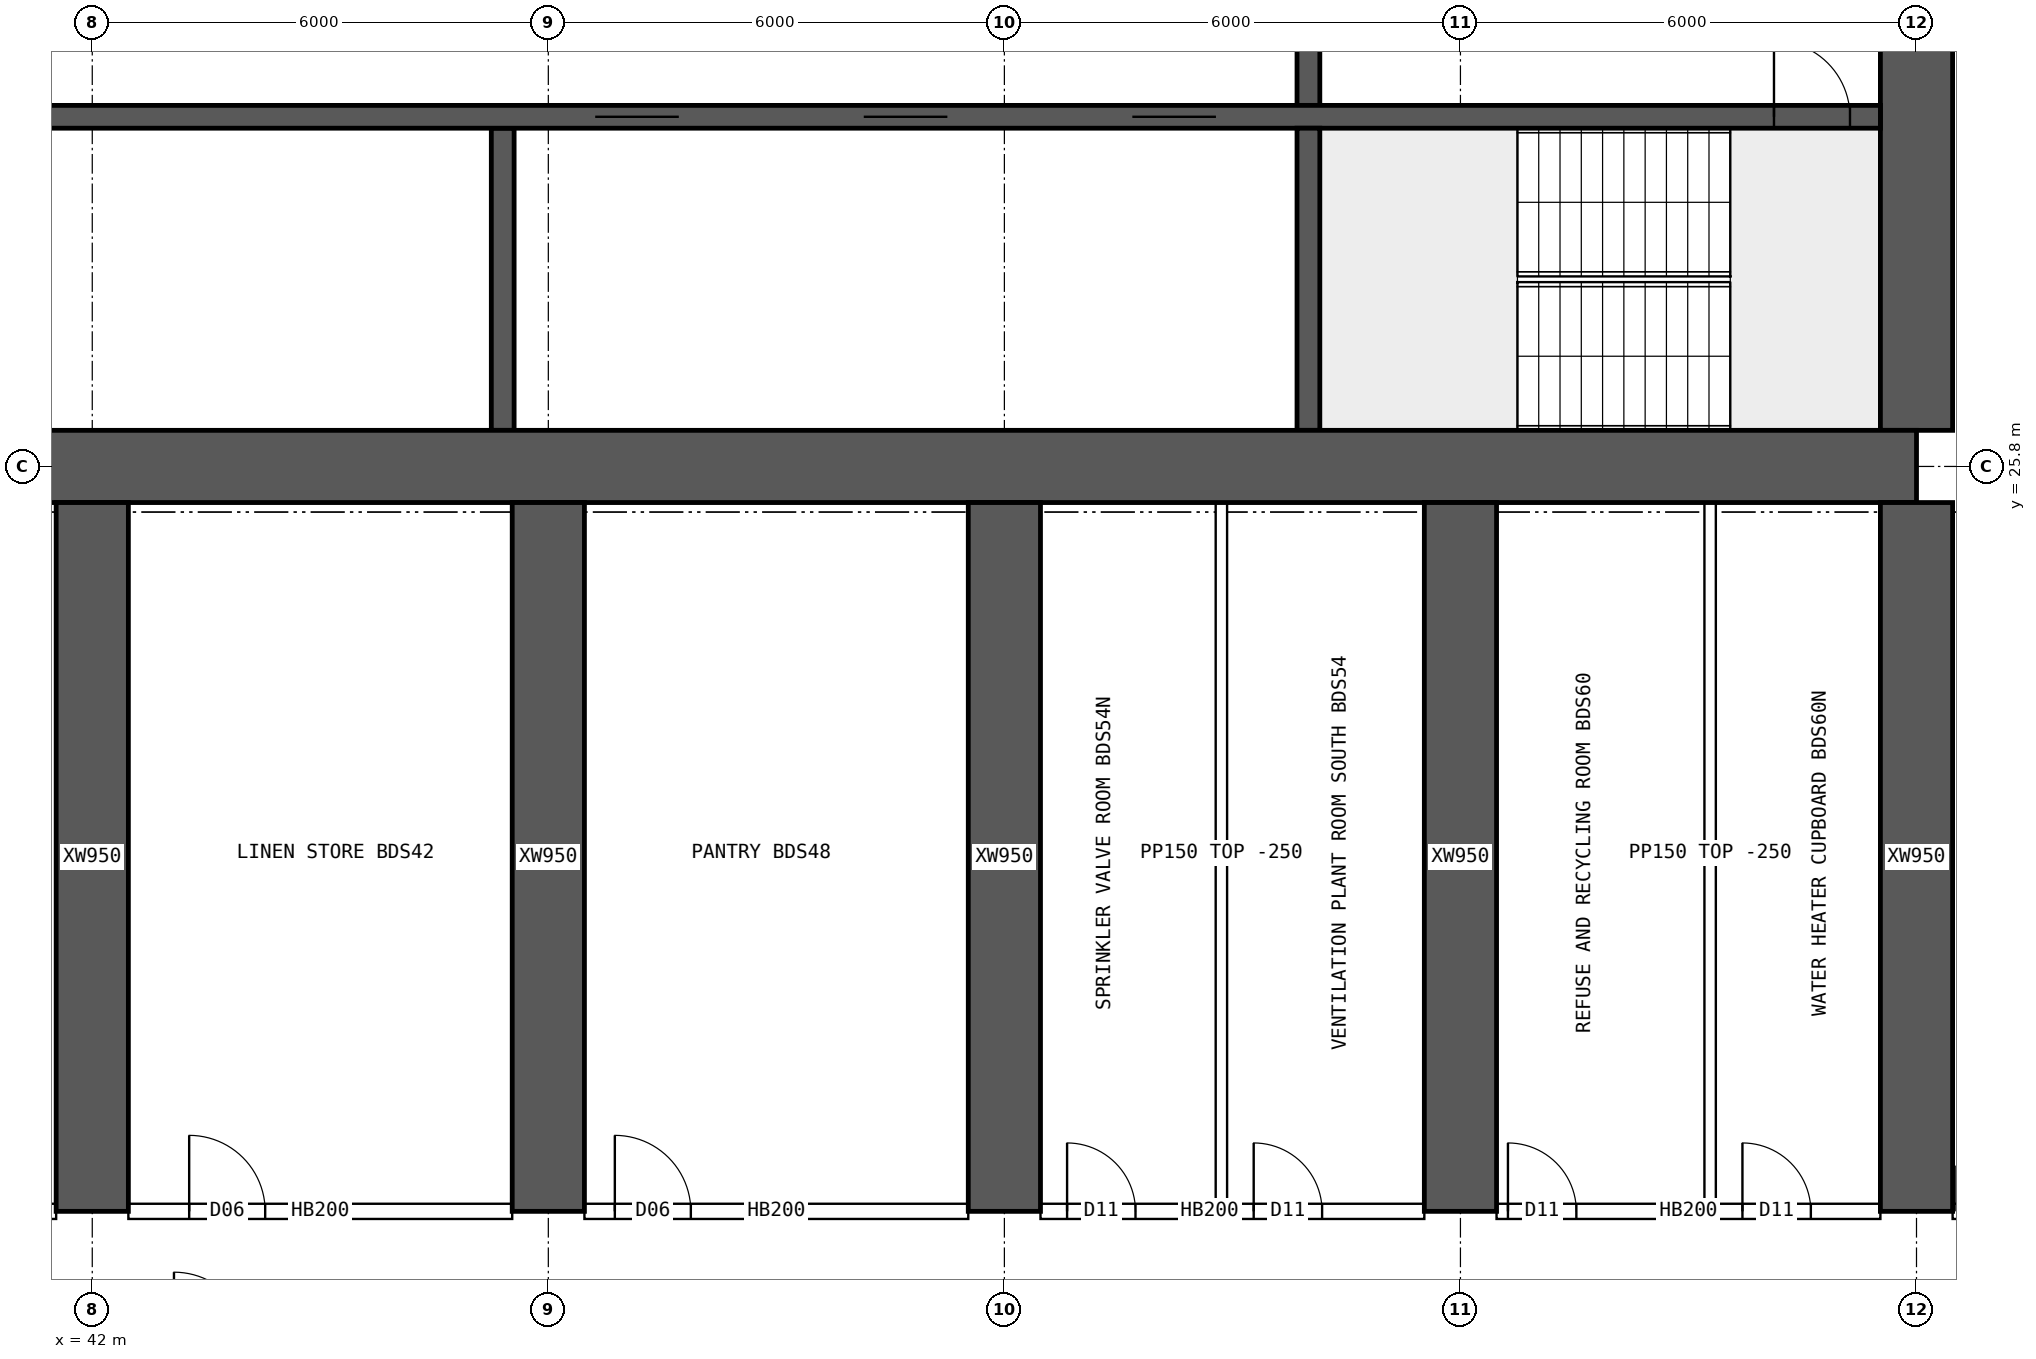
"""IFC4 building model, lengths in metres.
Left out: names, types, materials, properties, quantities, classifications, styles, units other than length and angle.
Written with IfcOpenShell. Run it as: python <this file> out.ifc"""

import sys

from ifc_helpers import new_model, si_unit, direction, frame, frame_2d, origin, place, context, subcontext, project, spatial, rectangle, extrude, element, fill, save


model = new_model("IFC4")
c1 = context("Model", 3, precision=1e-05, world=origin(), true_north=direction((0.0, 1.0)))
c2 = subcontext(c1, "Body", "Model", "MODEL_VIEW")
j1 = project(units=[si_unit("LENGTHUNIT", "METRE"), si_unit("PLANEANGLEUNIT", "RADIAN")], contexts=[c1])
p1 = place(None, origin())
s1 = spatial("IfcSite", under=j1, at=p1, CompositionType="ELEMENT")
p2 = place(p1, origin())
s2 = spatial("IfcBuilding", under=s1, at=p2, CompositionType="ELEMENT")
p3 = place(p2, frame((0.0, 0.0, 114.4)))
s3 = spatial("IfcBuildingStorey", under=s2, at=p3, CompositionType="ELEMENT", Elevation=114.4)
p4 = place(p3, frame((18.0, 25.8, 0.0), z_axis=(0.0, 0.0, 1.0), x_axis=(1.0, 0.0, 0.0)))
e1 = element("IfcWall", 1, at=p4, inside=s3, PredefinedType="SHEAR", context=c2, shape_type="SweptSolid", body=[
    extrude(rectangle(XDim=48.0, YDim=0.95, at=frame_2d((24.0, 0.0))), origin(), (0.0, 0.0, 1.0), 3.75),
])
p5 = place(p3, frame((66.0, 26.275, 0.0), z_axis=(0.0, 0.0, 1.0), x_axis=(0.0, 1.0, 0.0)))
e2 = element("IfcWall", 2, at=p5, inside=s3, PredefinedType="SHEAR", context=c2, shape_type="SweptSolid", body=[
    extrude(rectangle(XDim=11.45, YDim=0.95, at=frame_2d((5.725, 0.0))), origin(), (0.0, 0.0, 1.0), 3.75),
])
p6 = place(p5, frame((5.025, 0.0, 0.0)))
e3 = element("IfcOpeningElement", 3, at=p6, cuts=e2, PredefinedType="OPENING", context=c2, shape_type="SweptSolid", body=[
    extrude(rectangle(XDim=1.2, YDim=2.1, at=frame_2d((0.6, 1.05))), frame((0.0, 0.485, 0.0), z_axis=(0.0, -1.0, 0.0), x_axis=(1.0, 0.0, 0.0)), (0.0, 0.0, 1.0), 0.97),
])
p7 = place(p3, frame((18.475, 30.4, 0.0), z_axis=(0.0, 0.0, 1.0), x_axis=(1.0, 0.0, 0.0)))
e4 = element("IfcWall", 4, at=p7, inside=s3, PredefinedType="SHEAR", context=c2, shape_type="SweptSolid", body=[
    extrude(rectangle(XDim=47.05, YDim=0.3, at=frame_2d((23.525, 0.0))), origin(), (0.0, 0.0, 1.0), 3.75),
])
p8 = place(p7, frame((0.4, 0.0, 0.0)))
e5 = element("IfcOpeningElement", 5, at=p8, cuts=e4, PredefinedType="OPENING", context=c2, shape_type="SweptSolid", body=[
    extrude(rectangle(XDim=1.0, YDim=2.1, at=frame_2d((0.5, 1.05))), frame((0.0, 0.16, 0.0), z_axis=(0.0, -1.0, 0.0), x_axis=(1.0, 0.0, 0.0)), (0.0, 0.0, 1.0), 0.32),
])
p9 = place(p7, frame((45.65, 0.0, 0.0)))
e6 = element("IfcOpeningElement", 6, at=p9, cuts=e4, PredefinedType="OPENING", context=c2, shape_type="SweptSolid", body=[
    extrude(rectangle(XDim=1.0, YDim=2.1, at=frame_2d((0.5, 1.05))), frame((0.0, 0.16, 0.0), z_axis=(0.0, -1.0, 0.0), x_axis=(1.0, 0.0, 0.0)), (0.0, 0.0, 1.0), 0.32),
])
p10 = place(p7, frame((8.275, 0.0, 0.0)))
e7 = element("IfcOpeningElement", 7, at=p10, cuts=e4, PredefinedType="OPENING", context=c2, shape_type="SweptSolid", body=[
    extrude(rectangle(XDim=1.1, YDim=2.1, at=frame_2d((0.55, 1.05))), frame((0.0, 0.16, 0.0), z_axis=(0.0, -1.0, 0.0), x_axis=(1.0, 0.0, 0.0)), (0.0, 0.0, 1.0), 0.32),
])
p11 = place(p7, frame((10.875, 0.0, 0.0)))
e8 = element("IfcOpeningElement", 8, at=p11, cuts=e4, PredefinedType="OPENING", context=c2, shape_type="SweptSolid", body=[
    extrude(rectangle(XDim=1.1, YDim=2.1, at=frame_2d((0.55, 1.05))), frame((0.0, 0.16, 0.0), z_axis=(0.0, -1.0, 0.0), x_axis=(1.0, 0.0, 0.0)), (0.0, 0.0, 1.0), 0.32),
])
p12 = place(p7, frame((13.475, 0.0, 0.0)))
e9 = element("IfcOpeningElement", 9, at=p12, cuts=e4, PredefinedType="OPENING", context=c2, shape_type="SweptSolid", body=[
    extrude(rectangle(XDim=1.1, YDim=2.1, at=frame_2d((0.55, 1.05))), frame((0.0, 0.16, 0.0), z_axis=(0.0, -1.0, 0.0), x_axis=(1.0, 0.0, 0.0)), (0.0, 0.0, 1.0), 0.32),
])
p13 = place(p7, frame((16.075, 0.0, 0.0)))
e10 = element("IfcOpeningElement", 10, at=p13, cuts=e4, PredefinedType="OPENING", context=c2, shape_type="SweptSolid", body=[
    extrude(rectangle(XDim=1.1, YDim=2.1, at=frame_2d((0.55, 1.05))), frame((0.0, 0.16, 0.0), z_axis=(0.0, -1.0, 0.0), x_axis=(1.0, 0.0, 0.0)), (0.0, 0.0, 1.0), 0.32),
])
p14 = place(p7, frame((18.85, 0.0, 0.0)))
e11 = element("IfcOpeningElement", 11, at=p14, cuts=e4, PredefinedType="OPENING", context=c2, shape_type="SweptSolid", body=[
    extrude(rectangle(XDim=0.9, YDim=2.1, at=frame_2d((0.45, 1.05))), frame((0.0, 0.16, 0.0), z_axis=(0.0, -1.0, 0.0), x_axis=(1.0, 0.0, 0.0)), (0.0, 0.0, 1.0), 0.32),
])
p15 = place(p7, frame((30.142, 0.0, 0.0)))
e12 = element("IfcOpeningElement", 12, at=p15, cuts=e4, PredefinedType="OPENING", context=c2, shape_type="SweptSolid", body=[
    extrude(rectangle(XDim=1.1, YDim=2.1, at=frame_2d((0.55, 1.05))), frame((0.0, 0.16, 0.0), z_axis=(0.0, -1.0, 0.0), x_axis=(1.0, 0.0, 0.0)), (0.0, 0.0, 1.0), 0.32),
])
p16 = place(p7, frame((33.675, 0.0, 0.0)))
e13 = element("IfcOpeningElement", 13, at=p16, cuts=e4, PredefinedType="OPENING", context=c2, shape_type="SweptSolid", body=[
    extrude(rectangle(XDim=1.1, YDim=2.1, at=frame_2d((0.55, 1.05))), frame((0.0, 0.16, 0.0), z_axis=(0.0, -1.0, 0.0), x_axis=(1.0, 0.0, 0.0)), (0.0, 0.0, 1.0), 0.32),
])
p17 = place(p7, frame((37.208, 0.0, 0.0)))
e14 = element("IfcOpeningElement", 14, at=p17, cuts=e4, PredefinedType="OPENING", context=c2, shape_type="SweptSolid", body=[
    extrude(rectangle(XDim=1.1, YDim=2.1, at=frame_2d((0.55, 1.05))), frame((0.0, 0.16, 0.0), z_axis=(0.0, -1.0, 0.0), x_axis=(1.0, 0.0, 0.0)), (0.0, 0.0, 1.0), 0.32),
])
p18 = place(p3, frame((58.0, 26.275, 0.0), z_axis=(0.0, 0.0, 1.0), x_axis=(0.0, 1.0, 0.0)))
e15 = element("IfcWall", 15, at=p18, inside=s3, PredefinedType="SHEAR", context=c2, shape_type="SweptSolid", body=[
    extrude(rectangle(XDim=3.975, YDim=0.3, at=frame_2d((1.988, 0.0))), origin(), (0.0, 0.0, 1.0), 3.75),
])
p19 = place(p3, frame((58.0, 30.55, 0.0), z_axis=(0.0, 0.0, 1.0), x_axis=(0.0, 1.0, 0.0)))
e16 = element("IfcWall", 16, at=p19, inside=s3, PredefinedType="SHEAR", context=c2, shape_type="SweptSolid", body=[
    extrude(rectangle(XDim=3.9, YDim=0.3, at=frame_2d((1.95, 0.0))), origin(), (0.0, 0.0, 1.0), 3.75),
])
p20 = place(p19, frame((1.4, 0.0, 0.0)))
e17 = element("IfcOpeningElement", 17, at=p20, cuts=e16, PredefinedType="OPENING", context=c2, shape_type="SweptSolid", body=[
    extrude(rectangle(XDim=1.2, YDim=2.1, at=frame_2d((0.6, 1.05))), frame((0.0, 0.16, 0.0), z_axis=(0.0, -1.0, 0.0), x_axis=(1.0, 0.0, 0.0)), (0.0, 0.0, 1.0), 0.32),
])
p21 = place(p3, frame((47.4, 26.275, 0.0), z_axis=(0.0, 0.0, 1.0), x_axis=(0.0, 1.0, 0.0)))
e18 = element("IfcWall", 18, at=p21, inside=s3, PredefinedType="SHEAR", context=c2, shape_type="SweptSolid", body=[
    extrude(rectangle(XDim=3.975, YDim=0.3, at=frame_2d((1.988, 0.0))), origin(), (0.0, 0.0, 1.0), 3.75),
])
for number, where, z_axis, x_axis in (
    (19, (42.0, 16.0, 0.0), (0.0, 0.0, 1.0), (0.0, 1.0, 0.0)),
    (20, (48.0, 16.0, 0.0), (0.0, 0.0, 1.0), (0.0, 1.0, 0.0)),
    (21, (54.0, 16.0, 0.0), (0.0, 0.0, 1.0), (0.0, 1.0, 0.0)),
    (22, (60.0, 16.0, 0.0), (0.0, 0.0, 1.0), (0.0, 1.0, 0.0)),
    (23, (66.0, 16.0, 0.0), (0.0, 0.0, 1.0), (0.0, 1.0, 0.0)),
):
    element("IfcWall", number, at=place(p3, frame(where, z_axis=z_axis, x_axis=x_axis)), inside=s3, PredefinedType="SHEAR", context=c2, shape_type="SweptSolid", body=[
        extrude(rectangle(XDim=9.325, YDim=0.95, at=frame_2d((4.663, 0.0))), origin(), (0.0, 0.0, 1.0), 3.75),
    ])
p22 = place(p3, frame((36.475, 16.0, 0.0), z_axis=(0.0, 0.0, 1.0), x_axis=(1.0, 0.0, 0.0)))
e24 = element("IfcWall", 24, at=p22, inside=s3, PredefinedType="SOLIDWALL", context=c2, shape_type="SweptSolid", body=[
    extrude(rectangle(XDim=5.05, YDim=0.2, at=frame_2d((2.525, 0.0))), origin(), (0.0, 0.0, 1.0), 3.5),
])
p23 = place(p22, frame((0.15, 0.0, 0.0)))
e25 = element("IfcOpeningElement", 25, at=p23, cuts=e24, PredefinedType="OPENING", context=c2, shape_type="SweptSolid", body=[
    extrude(rectangle(XDim=0.9, YDim=2.1, at=frame_2d((0.45, 1.05))), frame((0.0, 0.11, 0.0), z_axis=(0.0, -1.0, 0.0), x_axis=(1.0, 0.0, 0.0)), (0.0, 0.0, 1.0), 0.22),
])
p24 = place(p22, frame((2.615, 0.0, 0.0)))
e26 = element("IfcOpeningElement", 26, at=p24, cuts=e24, PredefinedType="OPENING", context=c2, shape_type="SweptSolid", body=[
    extrude(rectangle(XDim=0.9, YDim=2.1, at=frame_2d((0.45, 1.05))), frame((0.0, 0.11, 0.0), z_axis=(0.0, -1.0, 0.0), x_axis=(1.0, 0.0, 0.0)), (0.0, 0.0, 1.0), 0.22),
])
p25 = place(p3, frame((42.475, 16.0, 0.0), z_axis=(0.0, 0.0, 1.0), x_axis=(1.0, 0.0, 0.0)))
e27 = element("IfcWall", 27, at=p25, inside=s3, PredefinedType="SOLIDWALL", context=c2, shape_type="SweptSolid", body=[
    extrude(rectangle(XDim=5.05, YDim=0.2, at=frame_2d((2.525, 0.0))), origin(), (0.0, 0.0, 1.0), 3.5),
])
p26 = place(p25, frame((0.8, 0.0, 0.0)))
e28 = element("IfcOpeningElement", 28, at=p26, cuts=e27, PredefinedType="OPENING", context=c2, shape_type="SweptSolid", body=[
    extrude(rectangle(XDim=1.0, YDim=2.1, at=frame_2d((0.5, 1.05))), frame((0.0, 0.11, 0.0), z_axis=(0.0, -1.0, 0.0), x_axis=(1.0, 0.0, 0.0)), (0.0, 0.0, 1.0), 0.22),
])
p27 = place(p3, frame((48.475, 16.0, 0.0), z_axis=(0.0, 0.0, 1.0), x_axis=(1.0, 0.0, 0.0)))
e29 = element("IfcWall", 29, at=p27, inside=s3, PredefinedType="SOLIDWALL", context=c2, shape_type="SweptSolid", body=[
    extrude(rectangle(XDim=5.05, YDim=0.2, at=frame_2d((2.525, 0.0))), origin(), (0.0, 0.0, 1.0), 3.5),
])
p28 = place(p27, frame((0.4, 0.0, 0.0)))
e30 = element("IfcOpeningElement", 30, at=p28, cuts=e29, PredefinedType="OPENING", context=c2, shape_type="SweptSolid", body=[
    extrude(rectangle(XDim=1.0, YDim=2.1, at=frame_2d((0.5, 1.05))), frame((0.0, 0.11, 0.0), z_axis=(0.0, -1.0, 0.0), x_axis=(1.0, 0.0, 0.0)), (0.0, 0.0, 1.0), 0.22),
])
p29 = place(p3, frame((54.475, 16.0, 0.0), z_axis=(0.0, 0.0, 1.0), x_axis=(1.0, 0.0, 0.0)))
e31 = element("IfcWall", 31, at=p29, inside=s3, PredefinedType="SOLIDWALL", context=c2, shape_type="SweptSolid", body=[
    extrude(rectangle(XDim=5.05, YDim=0.2, at=frame_2d((2.525, 0.0))), origin(), (0.0, 0.0, 1.0), 3.5),
])
p30 = place(p29, frame((0.35, 0.0, 0.0)))
e32 = element("IfcOpeningElement", 32, at=p30, cuts=e31, PredefinedType="OPENING", context=c2, shape_type="SweptSolid", body=[
    extrude(rectangle(XDim=0.9, YDim=2.1, at=frame_2d((0.45, 1.05))), frame((0.0, 0.11, 0.0), z_axis=(0.0, -1.0, 0.0), x_axis=(1.0, 0.0, 0.0)), (0.0, 0.0, 1.0), 0.22),
])
p31 = place(p29, frame((2.805, 0.0, 0.0)))
e33 = element("IfcOpeningElement", 33, at=p31, cuts=e31, PredefinedType="OPENING", context=c2, shape_type="SweptSolid", body=[
    extrude(rectangle(XDim=0.9, YDim=2.1, at=frame_2d((0.45, 1.05))), frame((0.0, 0.11, 0.0), z_axis=(0.0, -1.0, 0.0), x_axis=(1.0, 0.0, 0.0)), (0.0, 0.0, 1.0), 0.22),
])
p32 = place(p3, frame((60.475, 16.0, 0.0), z_axis=(0.0, 0.0, 1.0), x_axis=(1.0, 0.0, 0.0)))
e34 = element("IfcWall", 34, at=p32, inside=s3, PredefinedType="SOLIDWALL", context=c2, shape_type="SweptSolid", body=[
    extrude(rectangle(XDim=5.05, YDim=0.2, at=frame_2d((2.525, 0.0))), origin(), (0.0, 0.0, 1.0), 3.5),
])
p33 = place(p32, frame((0.15, 0.0, 0.0)))
e35 = element("IfcOpeningElement", 35, at=p33, cuts=e34, PredefinedType="OPENING", context=c2, shape_type="SweptSolid", body=[
    extrude(rectangle(XDim=0.9, YDim=2.1, at=frame_2d((0.45, 1.05))), frame((0.0, 0.11, 0.0), z_axis=(0.0, -1.0, 0.0), x_axis=(1.0, 0.0, 0.0)), (0.0, 0.0, 1.0), 0.22),
])
p34 = place(p32, frame((3.235, 0.0, 0.0)))
e36 = element("IfcOpeningElement", 36, at=p34, cuts=e34, PredefinedType="OPENING", context=c2, shape_type="SweptSolid", body=[
    extrude(rectangle(XDim=0.9, YDim=2.1, at=frame_2d((0.45, 1.05))), frame((0.0, 0.11, 0.0), z_axis=(0.0, -1.0, 0.0), x_axis=(1.0, 0.0, 0.0)), (0.0, 0.0, 1.0), 0.22),
])
p35 = place(p3, frame((66.475, 16.0, 0.0), z_axis=(0.0, 0.0, 1.0), x_axis=(1.0, 0.0, 0.0)))
e37 = element("IfcWall", 37, at=p35, inside=s3, PredefinedType="SOLIDWALL", context=c2, shape_type="SweptSolid", body=[
    extrude(rectangle(XDim=1.925, YDim=0.2, at=frame_2d((0.962, 0.0))), origin(), (0.0, 0.0, 1.0), 3.5),
])
p36 = place(p35, frame((0.05, 0.0, 0.0)))
e38 = element("IfcOpeningElement", 38, at=p36, cuts=e37, PredefinedType="OPENING", context=c2, shape_type="SweptSolid", body=[
    extrude(rectangle(XDim=1.2, YDim=2.1, at=frame_2d((0.6, 1.05))), frame((0.0, 0.11, 0.0), z_axis=(0.0, -1.0, 0.0), x_axis=(1.0, 0.0, 0.0)), (0.0, 0.0, 1.0), 0.22),
])
for number, where, z_axis, x_axis in (
    (39, (56.855, 16.1, 0.0), (0.0, 0.0, 1.0), (0.0, 1.0, 0.0)),
    (40, (63.285, 16.1, 0.0), (0.0, 0.0, 1.0), (0.0, 1.0, 0.0)),
):
    element("IfcWall", number, at=place(p3, frame(where, z_axis=z_axis, x_axis=x_axis)), inside=s3, PredefinedType="PARTITIONING", context=c2, shape_type="SweptSolid", body=[
        extrude(rectangle(XDim=9.225, YDim=0.15, at=frame_2d((4.612, 0.0))), origin(), (0.0, 0.0, 1.0), 3.5),
    ])
p37 = place(p9, origin())
e41 = element("IfcDoor", 41, at=p37, inside=s3, OperationType="SINGLE_SWING_LEFT", PredefinedType="DOOR", context=c2, shape_type="SweptSolid", body=[
    extrude(rectangle(XDim=1.0, YDim=2.1, at=frame_2d((0.5, 1.05))), frame((0.0, 0.025, 0.0), z_axis=(0.0, -1.0, 0.0), x_axis=(1.0, 0.0, 0.0)), (0.0, 0.0, 1.0), 0.05),
])
fill(e6, e41)
p38 = place(p15, origin())
e42 = element("IfcDoor", 42, at=p38, inside=s3, OperationType="DOUBLE_DOOR_SLIDING", PredefinedType="DOOR", context=c2, shape_type="SweptSolid", body=[
    extrude(rectangle(XDim=1.1, YDim=2.1, at=frame_2d((0.55, 1.05))), frame((0.0, 0.025, 0.0), z_axis=(0.0, -1.0, 0.0), x_axis=(1.0, 0.0, 0.0)), (0.0, 0.0, 1.0), 0.05),
])
fill(e12, e42)
p39 = place(p16, origin())
e43 = element("IfcDoor", 43, at=p39, inside=s3, OperationType="DOUBLE_DOOR_SLIDING", PredefinedType="DOOR", context=c2, shape_type="SweptSolid", body=[
    extrude(rectangle(XDim=1.1, YDim=2.1, at=frame_2d((0.55, 1.05))), frame((0.0, 0.025, 0.0), z_axis=(0.0, -1.0, 0.0), x_axis=(1.0, 0.0, 0.0)), (0.0, 0.0, 1.0), 0.05),
])
fill(e13, e43)
p40 = place(p17, origin())
e44 = element("IfcDoor", 44, at=p40, inside=s3, OperationType="DOUBLE_DOOR_SLIDING", PredefinedType="DOOR", context=c2, shape_type="SweptSolid", body=[
    extrude(rectangle(XDim=1.1, YDim=2.1, at=frame_2d((0.55, 1.05))), frame((0.0, 0.025, 0.0), z_axis=(0.0, -1.0, 0.0), x_axis=(1.0, 0.0, 0.0)), (0.0, 0.0, 1.0), 0.05),
])
fill(e14, e44)
p41 = place(p26, origin())
e45 = element("IfcDoor", 45, at=p41, inside=s3, OperationType="SINGLE_SWING_LEFT", PredefinedType="DOOR", context=c2, shape_type="SweptSolid", body=[
    extrude(rectangle(XDim=1.0, YDim=2.1, at=frame_2d((0.5, 1.05))), frame((0.0, 0.025, 0.0), z_axis=(0.0, -1.0, 0.0), x_axis=(1.0, 0.0, 0.0)), (0.0, 0.0, 1.0), 0.05),
])
fill(e28, e45)
p42 = place(p28, origin())
e46 = element("IfcDoor", 46, at=p42, inside=s3, OperationType="SINGLE_SWING_LEFT", PredefinedType="DOOR", context=c2, shape_type="SweptSolid", body=[
    extrude(rectangle(XDim=1.0, YDim=2.1, at=frame_2d((0.5, 1.05))), frame((0.0, 0.025, 0.0), z_axis=(0.0, -1.0, 0.0), x_axis=(1.0, 0.0, 0.0)), (0.0, 0.0, 1.0), 0.05),
])
fill(e30, e46)
p43 = place(p30, origin())
e47 = element("IfcDoor", 47, at=p43, inside=s3, OperationType="SINGLE_SWING_LEFT", PredefinedType="DOOR", context=c2, shape_type="SweptSolid", body=[
    extrude(rectangle(XDim=0.9, YDim=2.1, at=frame_2d((0.45, 1.05))), frame((0.0, 0.025, 0.0), z_axis=(0.0, -1.0, 0.0), x_axis=(1.0, 0.0, 0.0)), (0.0, 0.0, 1.0), 0.05),
])
fill(e32, e47)
p44 = place(p31, origin())
e48 = element("IfcDoor", 48, at=p44, inside=s3, OperationType="SINGLE_SWING_LEFT", PredefinedType="DOOR", context=c2, shape_type="SweptSolid", body=[
    extrude(rectangle(XDim=0.9, YDim=2.1, at=frame_2d((0.45, 1.05))), frame((0.0, 0.025, 0.0), z_axis=(0.0, -1.0, 0.0), x_axis=(1.0, 0.0, 0.0)), (0.0, 0.0, 1.0), 0.05),
])
fill(e33, e48)
p45 = place(p33, origin())
e49 = element("IfcDoor", 49, at=p45, inside=s3, OperationType="SINGLE_SWING_LEFT", PredefinedType="DOOR", context=c2, shape_type="SweptSolid", body=[
    extrude(rectangle(XDim=0.9, YDim=2.1, at=frame_2d((0.45, 1.05))), frame((0.0, 0.025, 0.0), z_axis=(0.0, -1.0, 0.0), x_axis=(1.0, 0.0, 0.0)), (0.0, 0.0, 1.0), 0.05),
])
fill(e35, e49)
p46 = place(p34, origin())
e50 = element("IfcDoor", 50, at=p46, inside=s3, OperationType="SINGLE_SWING_LEFT", PredefinedType="DOOR", context=c2, shape_type="SweptSolid", body=[
    extrude(rectangle(XDim=0.9, YDim=2.1, at=frame_2d((0.45, 1.05))), frame((0.0, 0.025, 0.0), z_axis=(0.0, -1.0, 0.0), x_axis=(1.0, 0.0, 0.0)), (0.0, 0.0, 1.0), 0.05),
])
fill(e36, e50)
save(model, sys.argv[1])
